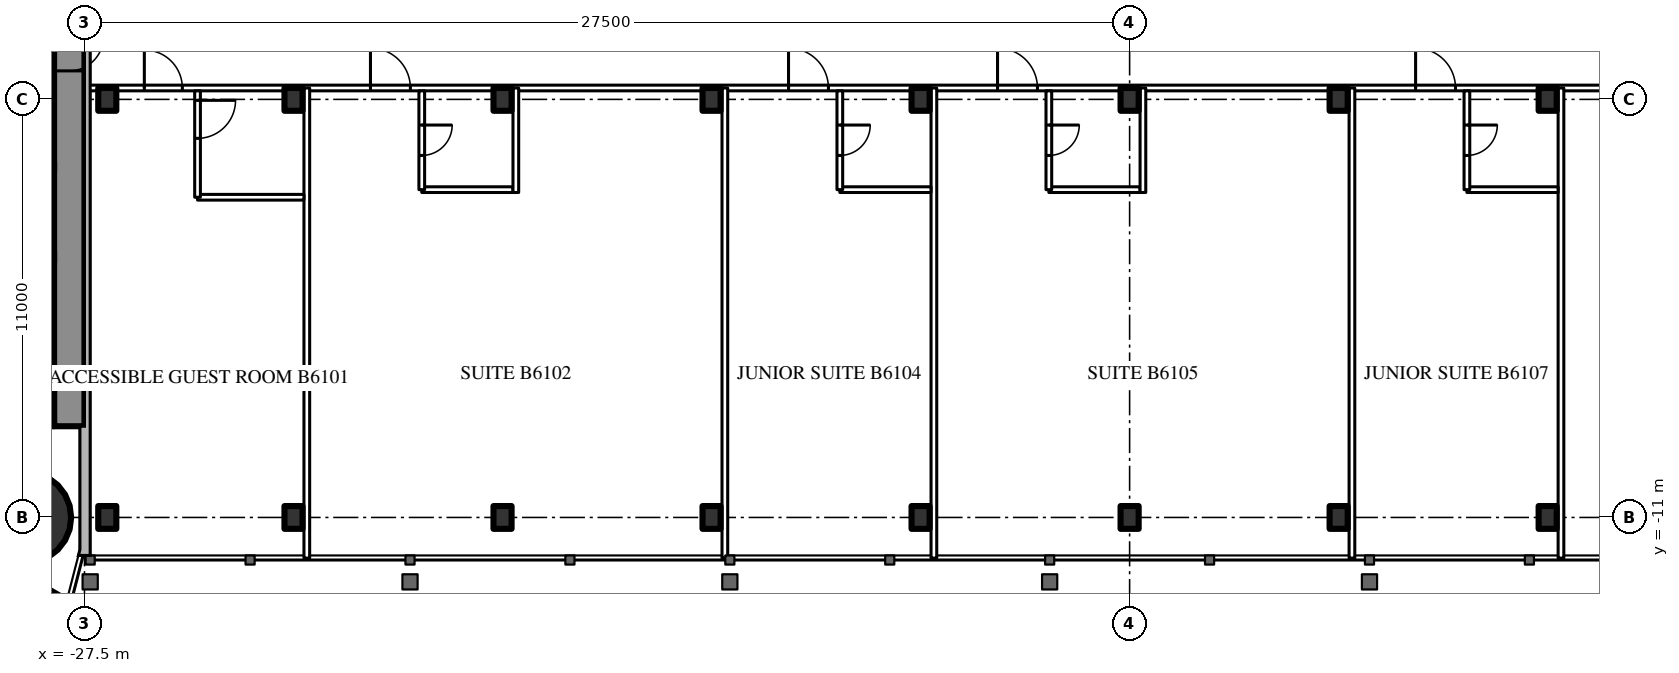
"""IFC4 building model, lengths in metres.
Left out: names, types, materials, properties, quantities, classifications, styles, units other than length and angle.
Written with IfcOpenShell. Run it as: python <this file> out.ifc"""

import sys

from ifc_helpers import new_model, si_unit, direction, frame, frame_2d, origin, origin_2d, place, context, subcontext, project, spatial, rectangle, circle, i_section, extrude, element, fill, save


model = new_model("IFC4")
c1 = context("Model", 3, precision=1e-05, world=origin(), true_north=direction((0.0, 1.0)))
c2 = subcontext(c1, "Body", "Model", "MODEL_VIEW")
j1 = project(units=[si_unit("LENGTHUNIT", "METRE"), si_unit("PLANEANGLEUNIT", "RADIAN")], contexts=[c1])
p1 = place(None, origin())
s1 = spatial("IfcSite", under=j1, at=p1, CompositionType="ELEMENT")
p2 = place(p1, origin())
s2 = spatial("IfcBuilding", under=s1, at=p2, CompositionType="ELEMENT")
p3 = place(p2, frame((0.0, 0.0, 229.7)))
s3 = spatial("IfcBuildingStorey", under=s2, at=p3, CompositionType="ELEMENT", Elevation=229.7)
p4 = place(p3, frame((-29.05, -11.0, 0.0), z_axis=(0.0, 0.0, 1.0), x_axis=(1.0, 0.0, 0.0)))
e1 = element("IfcColumn", 1, at=p4, inside=s3, PredefinedType="COLUMN", context=c2, shape_type="SweptSolid", body=[
    extrude(circle(Radius=1.2, at=origin_2d()), origin(), (0.0, 0.0, 1.0), 3.6),
])
p5 = place(p3, frame((-27.9, 8.6, 0.0), z_axis=(0.0, 0.0, 1.0), x_axis=(0.0, -1.0, 0.0)))
e2 = element("IfcWall", 2, at=p5, inside=s3, PredefinedType="SHEAR", context=c2, shape_type="SweptSolid", body=[
    extrude(rectangle(XDim=17.2, YDim=0.8, at=frame_2d((8.6, 0.0))), origin(), (0.0, 0.0, 1.0), 3.6),
])
p6 = place(p5, frame((6.95, 0.0, 0.0)))
e3 = element("IfcOpeningElement", 3, at=p6, cuts=e2, PredefinedType="OPENING", context=c2, shape_type="SweptSolid", body=[
    extrude(rectangle(XDim=0.9, YDim=2.2, at=frame_2d((0.45, 1.1))), frame((0.0, 0.41, 0.0), z_axis=(0.0, -1.0, 0.0), x_axis=(1.0, 0.0, 0.0)), (0.0, 0.0, 1.0), 0.82),
])
p7 = place(p3, frame((-28.3, -8.0, 0.0), z_axis=(0.0, 0.0, 1.0), x_axis=(-1.0, 0.0, 0.0)))
e4 = element("IfcWall", 4, at=p7, inside=s3, PredefinedType="SHEAR", context=c2, shape_type="SweptSolid", body=[
    extrude(rectangle(XDim=8.4, YDim=1.2, at=frame_2d((4.2, 0.0))), origin(), (0.0, 0.0, 1.0), 3.6),
])
p8 = place(p7, frame((0.25, 0.0, 0.0)))
e5 = element("IfcOpeningElement", 5, at=p8, cuts=e4, PredefinedType="OPENING", context=c2, shape_type="SweptSolid", body=[
    extrude(rectangle(XDim=1.0, YDim=2.2, at=frame_2d((0.5, 1.1))), frame((0.0, 0.61, 0.0), z_axis=(0.0, -1.0, 0.0), x_axis=(1.0, 0.0, 0.0)), (0.0, 0.0, 1.0), 1.22),
])
p9 = place(p3, frame((-28.3, -4.15, 0.0), z_axis=(0.0, 0.0, 1.0), x_axis=(-1.0, 0.0, 0.0)))
e6 = element("IfcWall", 6, at=p9, inside=s3, PredefinedType="SHEAR", context=c2, shape_type="SweptSolid", body=[
    extrude(rectangle(XDim=8.4, YDim=0.3, at=frame_2d((4.2, 0.0))), origin(), (0.0, 0.0, 1.0), 3.6),
])
p10 = place(p3, frame((-28.3, -1.775, 0.0), z_axis=(0.0, 0.0, 1.0), x_axis=(-1.0, 0.0, 0.0)))
e7 = element("IfcWall", 7, at=p10, inside=s3, PredefinedType="SHEAR", context=c2, shape_type="SweptSolid", body=[
    extrude(rectangle(XDim=2.9, YDim=0.25, at=frame_2d((1.45, 0.0))), origin(), (0.0, 0.0, 1.0), 3.6),
])
p11 = place(p3, frame((-27.2, 14.3, 0.0), z_axis=(0.0, 0.0, 1.0), x_axis=(-0.866026593062, -0.499997940104, 0.0)))
e8 = element("IfcWall", 8, at=p11, inside=s3, PredefinedType="SHEAR", context=c2, shape_type="SweptSolid", body=[
    extrude(rectangle(XDim=28.946, YDim=1.2, at=frame_2d((14.473, 0.0))), origin(), (0.0, 0.0, 1.0), 3.6),
])
p12 = place(p11, frame((4.6, 0.0, 0.0)))
e9 = element("IfcOpeningElement", 9, at=p12, cuts=e8, PredefinedType="OPENING", context=c2, shape_type="SweptSolid", body=[
    extrude(rectangle(XDim=1.0, YDim=2.2, at=frame_2d((0.5, 1.1))), frame((0.0, 0.61, 0.0), z_axis=(0.0, -1.0, 0.0), x_axis=(1.0, 0.0, 0.0)), (0.0, 0.0, 1.0), 1.22),
])
p13 = place(p11, frame((13.395, 0.0, 0.0)))
e10 = element("IfcOpeningElement", 10, at=p13, cuts=e8, PredefinedType="OPENING", context=c2, shape_type="SweptSolid", body=[
    extrude(rectangle(XDim=1.8, YDim=2.2, at=frame_2d((0.9, 1.1))), frame((0.0, 0.61, 0.0), z_axis=(0.0, -1.0, 0.0), x_axis=(1.0, 0.0, 0.0)), (0.0, 0.0, 1.0), 1.22),
])
p14 = place(p3, frame((-27.2, -14.3, 0.0), z_axis=(0.0, 0.0, 1.0), x_axis=(-0.866024021859, 0.500002393557, 0.0)))
e11 = element("IfcWall", 11, at=p14, inside=s3, PredefinedType="SHEAR", context=c2, shape_type="SweptSolid", body=[
    extrude(rectangle(XDim=27.907, YDim=1.2, at=frame_2d((13.954, 0.0))), origin(), (0.0, 0.0, 1.0), 3.6),
])
p15 = place(p14, frame((4.6, 0.0, 0.0)))
e12 = element("IfcOpeningElement", 12, at=p15, cuts=e11, PredefinedType="OPENING", context=c2, shape_type="SweptSolid", body=[
    extrude(rectangle(XDim=1.0, YDim=2.2, at=frame_2d((0.5, 1.1))), frame((0.0, 0.61, 0.0), z_axis=(0.0, -1.0, 0.0), x_axis=(1.0, 0.0, 0.0)), (0.0, 0.0, 1.0), 1.22),
])
p16 = place(p14, frame((13.395, 0.0, 0.0)))
e13 = element("IfcOpeningElement", 13, at=p16, cuts=e11, PredefinedType="OPENING", context=c2, shape_type="SweptSolid", body=[
    extrude(rectangle(XDim=1.8, YDim=2.2, at=frame_2d((0.9, 1.1))), frame((0.0, 0.61, 0.0), z_axis=(0.0, -1.0, 0.0), x_axis=(1.0, 0.0, 0.0)), (0.0, 0.0, 1.0), 1.22),
])
for number, where, z_axis, x_axis in (
    (14, (-26.9, -11.0, 0.0), (0.0, 0.0, 1.0), (1.0, 0.0, 0.0)),
    (15, (-22.0, -11.0, 0.0), (0.0, 0.0, 1.0), (1.0, 0.0, 0.0)),
    (16, (-16.5, -11.0, 0.0), (0.0, 0.0, 1.0), (1.0, 0.0, 0.0)),
    (17, (-11.0, -11.0, 0.0), (0.0, 0.0, 1.0), (1.0, 0.0, 0.0)),
    (18, (-5.5, -11.0, 0.0), (0.0, 0.0, 1.0), (1.0, 0.0, 0.0)),
    (19, (0.0, -11.0, 0.0), (0.0, 0.0, 1.0), (1.0, 0.0, 0.0)),
    (20, (5.5, -11.0, 0.0), (0.0, 0.0, 1.0), (1.0, 0.0, 0.0)),
    (21, (11.0, -11.0, 0.0), (0.0, 0.0, 1.0), (1.0, 0.0, 0.0)),
    (22, (-26.9, 0.0, 0.0), (0.0, 0.0, 1.0), (1.0, 0.0, 0.0)),
    (23, (-22.0, 0.0, 0.0), (0.0, 0.0, 1.0), (1.0, 0.0, 0.0)),
    (24, (-16.5, 0.0, 0.0), (0.0, 0.0, 1.0), (1.0, 0.0, 0.0)),
    (25, (-11.0, 0.0, 0.0), (0.0, 0.0, 1.0), (1.0, 0.0, 0.0)),
    (26, (-5.5, 0.0, 0.0), (0.0, 0.0, 1.0), (1.0, 0.0, 0.0)),
    (27, (0.0, 0.0, 0.0), (0.0, 0.0, 1.0), (1.0, 0.0, 0.0)),
    (28, (5.5, 0.0, 0.0), (0.0, 0.0, 1.0), (1.0, 0.0, 0.0)),
    (29, (11.0, 0.0, 0.0), (0.0, 0.0, 1.0), (1.0, 0.0, 0.0)),
):
    element("IfcColumn", number, at=place(p3, frame(where, z_axis=z_axis, x_axis=x_axis)), inside=s3, PredefinedType="COLUMN", context=c2, shape_type="SweptSolid", body=[
        extrude(i_section(OverallWidth=0.476, OverallDepth=0.6, WebThickness=0.1, FlangeThickness=0.14, FilletRadius=0.02, at=origin_2d()), origin(), (0.0, 0.0, 1.0), 3.6),
    ])
p17 = place(p3, frame((-27.5, 0.3, 0.0), z_axis=(0.0, 0.0, 1.0), x_axis=(1.0, 0.0, 0.0)))
e30 = element("IfcWall", 30, at=p17, inside=s3, PredefinedType="PARTITIONING", context=c2, shape_type="SweptSolid", body=[
    extrude(rectangle(XDim=55.0, YDim=0.15, at=frame_2d((27.5, 0.0))), origin(), (0.0, 0.0, 1.0), 2.4),
])
p18 = place(p17, frame((1.575, 0.0, 0.0)))
e31 = element("IfcOpeningElement", 31, at=p18, cuts=e30, PredefinedType="OPENING", context=c2, shape_type="SweptSolid", body=[
    extrude(rectangle(XDim=1.0, YDim=2.2, at=frame_2d((0.5, 1.1))), frame((0.0, 0.085, 0.0), z_axis=(0.0, -1.0, 0.0), x_axis=(1.0, 0.0, 0.0)), (0.0, 0.0, 1.0), 0.17),
])
p19 = place(p17, frame((7.525, 0.0, 0.0)))
e32 = element("IfcOpeningElement", 32, at=p19, cuts=e30, PredefinedType="OPENING", context=c2, shape_type="SweptSolid", body=[
    extrude(rectangle(XDim=1.05, YDim=2.4, at=frame_2d((0.525, 1.2))), frame((0.0, 0.085, 0.0), z_axis=(0.0, -1.0, 0.0), x_axis=(1.0, 0.0, 0.0)), (0.0, 0.0, 1.0), 0.17),
])
p20 = place(p17, frame((18.525, 0.0, 0.0)))
e33 = element("IfcOpeningElement", 33, at=p20, cuts=e30, PredefinedType="OPENING", context=c2, shape_type="SweptSolid", body=[
    extrude(rectangle(XDim=1.05, YDim=2.4, at=frame_2d((0.525, 1.2))), frame((0.0, 0.085, 0.0), z_axis=(0.0, -1.0, 0.0), x_axis=(1.0, 0.0, 0.0)), (0.0, 0.0, 1.0), 0.17),
])
p21 = place(p17, frame((24.025, 0.0, 0.0)))
e34 = element("IfcOpeningElement", 34, at=p21, cuts=e30, PredefinedType="OPENING", context=c2, shape_type="SweptSolid", body=[
    extrude(rectangle(XDim=1.05, YDim=2.4, at=frame_2d((0.525, 1.2))), frame((0.0, 0.085, 0.0), z_axis=(0.0, -1.0, 0.0), x_axis=(1.0, 0.0, 0.0)), (0.0, 0.0, 1.0), 0.17),
])
p22 = place(p17, frame((35.025, 0.0, 0.0)))
e35 = element("IfcOpeningElement", 35, at=p22, cuts=e30, PredefinedType="OPENING", context=c2, shape_type="SweptSolid", body=[
    extrude(rectangle(XDim=1.05, YDim=2.4, at=frame_2d((0.525, 1.2))), frame((0.0, 0.085, 0.0), z_axis=(0.0, -1.0, 0.0), x_axis=(1.0, 0.0, 0.0)), (0.0, 0.0, 1.0), 0.17),
])
p23 = place(p17, frame((40.525, 0.0, 0.0)))
e36 = element("IfcOpeningElement", 36, at=p23, cuts=e30, PredefinedType="OPENING", context=c2, shape_type="SweptSolid", body=[
    extrude(rectangle(XDim=1.05, YDim=2.4, at=frame_2d((0.525, 1.2))), frame((0.0, 0.085, 0.0), z_axis=(0.0, -1.0, 0.0), x_axis=(1.0, 0.0, 0.0)), (0.0, 0.0, 1.0), 0.17),
])
p24 = place(p17, frame((52.525, 0.0, 0.0)))
e37 = element("IfcOpeningElement", 37, at=p24, cuts=e30, PredefinedType="OPENING", context=c2, shape_type="SweptSolid", body=[
    extrude(rectangle(XDim=1.05, YDim=2.4, at=frame_2d((0.525, 1.2))), frame((0.0, 0.085, 0.0), z_axis=(0.0, -1.0, 0.0), x_axis=(1.0, 0.0, 0.0)), (0.0, 0.0, 1.0), 0.17),
])
for number, where, z_axis, x_axis in (
    (38, (-21.65, -12.07, 0.0), (0.0, 0.0, 1.0), (0.0, 1.0, 0.0)),
    (39, (-10.65, -12.07, 0.0), (0.0, 0.0, 1.0), (0.0, 1.0, 0.0)),
    (40, (-5.15, -12.07, 0.0), (0.0, 0.0, 1.0), (0.0, 1.0, 0.0)),
    (41, (5.85, -12.07, 0.0), (0.0, 0.0, 1.0), (0.0, 1.0, 0.0)),
    (42, (11.35, -12.07, 0.0), (0.0, 0.0, 1.0), (0.0, 1.0, 0.0)),
):
    element("IfcWall", number, at=place(p3, frame(where, z_axis=z_axis, x_axis=x_axis)), inside=s3, PredefinedType="PARTITIONING", context=c2, shape_type="SweptSolid", body=[
        extrude(rectangle(XDim=12.37, YDim=0.15, at=frame_2d((6.185, 0.0))), origin(), (0.0, 0.0, 1.0), 3.4),
    ])
p25 = place(p3, frame((-24.525, -2.575, 0.0), z_axis=(0.0, 0.0, 1.0), x_axis=(1.0, 0.0, 0.0)))
e43 = element("IfcWall", 43, at=p25, inside=s3, PredefinedType="PARTITIONING", context=c2, shape_type="SweptSolid", body=[
    extrude(rectangle(XDim=2.8, YDim=0.15, at=frame_2d((1.4, 0.0))), origin(), (0.0, 0.0, 1.0), 3.4),
])
p26 = place(p3, frame((-24.525, -2.575, 0.0), z_axis=(0.0, 0.0, 1.0), x_axis=(0.0, 1.0, 0.0)))
e44 = element("IfcWall", 44, at=p26, inside=s3, PredefinedType="PARTITIONING", context=c2, shape_type="SweptSolid", body=[
    extrude(rectangle(XDim=2.8, YDim=0.15, at=frame_2d((1.4, 0.0))), origin(), (0.0, 0.0, 1.0), 3.4),
])
p27 = place(p26, frame((1.55, 0.0, 0.0)))
e45 = element("IfcOpeningElement", 45, at=p27, cuts=e44, PredefinedType="OPENING", context=c2, shape_type="SweptSolid", body=[
    extrude(rectangle(XDim=1.0, YDim=2.2, at=frame_2d((0.5, 1.1))), frame((0.0, 0.085, 0.0), z_axis=(0.0, -1.0, 0.0), x_axis=(1.0, 0.0, 0.0)), (0.0, 0.0, 1.0), 0.17),
])
p28 = place(p3, frame((-18.625, -2.375, 0.0), z_axis=(0.0, 0.0, 1.0), x_axis=(1.0, 0.0, 0.0)))
e46 = element("IfcWall", 46, at=p28, inside=s3, PredefinedType="PARTITIONING", context=c2, shape_type="SweptSolid", body=[
    extrude(rectangle(XDim=2.4, YDim=0.15, at=frame_2d((1.2, 0.0))), origin(), (0.0, 0.0, 1.0), 3.4),
])
p29 = place(p3, frame((-18.625, -2.375, 0.0), z_axis=(0.0, 0.0, 1.0), x_axis=(0.0, 1.0, 0.0)))
e47 = element("IfcWall", 47, at=p29, inside=s3, PredefinedType="PARTITIONING", context=c2, shape_type="SweptSolid", body=[
    extrude(rectangle(XDim=2.6, YDim=0.15, at=frame_2d((1.3, 0.0))), origin(), (0.0, 0.0, 1.0), 3.4),
])
p30 = place(p29, frame((0.9, 0.0, 0.0)))
e48 = element("IfcOpeningElement", 48, at=p30, cuts=e47, PredefinedType="OPENING", context=c2, shape_type="SweptSolid", body=[
    extrude(rectangle(XDim=0.8, YDim=2.2, at=frame_2d((0.4, 1.1))), frame((0.0, 0.085, 0.0), z_axis=(0.0, -1.0, 0.0), x_axis=(1.0, 0.0, 0.0)), (0.0, 0.0, 1.0), 0.17),
])
p31 = place(p3, frame((-7.625, -2.375, 0.0), z_axis=(0.0, 0.0, 1.0), x_axis=(1.0, 0.0, 0.0)))
e49 = element("IfcWall", 49, at=p31, inside=s3, PredefinedType="PARTITIONING", context=c2, shape_type="SweptSolid", body=[
    extrude(rectangle(XDim=2.4, YDim=0.15, at=frame_2d((1.2, 0.0))), origin(), (0.0, 0.0, 1.0), 3.4),
])
p32 = place(p3, frame((-7.625, -2.375, 0.0), z_axis=(0.0, 0.0, 1.0), x_axis=(0.0, 1.0, 0.0)))
e50 = element("IfcWall", 50, at=p32, inside=s3, PredefinedType="PARTITIONING", context=c2, shape_type="SweptSolid", body=[
    extrude(rectangle(XDim=2.6, YDim=0.15, at=frame_2d((1.3, 0.0))), origin(), (0.0, 0.0, 1.0), 3.4),
])
p33 = place(p32, frame((0.9, 0.0, 0.0)))
e51 = element("IfcOpeningElement", 51, at=p33, cuts=e50, PredefinedType="OPENING", context=c2, shape_type="SweptSolid", body=[
    extrude(rectangle(XDim=0.8, YDim=2.2, at=frame_2d((0.4, 1.1))), frame((0.0, 0.085, 0.0), z_axis=(0.0, -1.0, 0.0), x_axis=(1.0, 0.0, 0.0)), (0.0, 0.0, 1.0), 0.17),
])
p34 = place(p3, frame((-2.125, -2.375, 0.0), z_axis=(0.0, 0.0, 1.0), x_axis=(1.0, 0.0, 0.0)))
e52 = element("IfcWall", 52, at=p34, inside=s3, PredefinedType="PARTITIONING", context=c2, shape_type="SweptSolid", body=[
    extrude(rectangle(XDim=2.4, YDim=0.15, at=frame_2d((1.2, 0.0))), origin(), (0.0, 0.0, 1.0), 3.4),
])
p35 = place(p3, frame((-2.125, -2.375, 0.0), z_axis=(0.0, 0.0, 1.0), x_axis=(0.0, 1.0, 0.0)))
e53 = element("IfcWall", 53, at=p35, inside=s3, PredefinedType="PARTITIONING", context=c2, shape_type="SweptSolid", body=[
    extrude(rectangle(XDim=2.6, YDim=0.15, at=frame_2d((1.3, 0.0))), origin(), (0.0, 0.0, 1.0), 3.4),
])
p36 = place(p35, frame((0.9, 0.0, 0.0)))
e54 = element("IfcOpeningElement", 54, at=p36, cuts=e53, PredefinedType="OPENING", context=c2, shape_type="SweptSolid", body=[
    extrude(rectangle(XDim=0.8, YDim=2.2, at=frame_2d((0.4, 1.1))), frame((0.0, 0.085, 0.0), z_axis=(0.0, -1.0, 0.0), x_axis=(1.0, 0.0, 0.0)), (0.0, 0.0, 1.0), 0.17),
])
p37 = place(p3, frame((8.875, -2.375, 0.0), z_axis=(0.0, 0.0, 1.0), x_axis=(1.0, 0.0, 0.0)))
e55 = element("IfcWall", 55, at=p37, inside=s3, PredefinedType="PARTITIONING", context=c2, shape_type="SweptSolid", body=[
    extrude(rectangle(XDim=2.4, YDim=0.15, at=frame_2d((1.2, 0.0))), origin(), (0.0, 0.0, 1.0), 3.4),
])
p38 = place(p3, frame((8.875, -2.375, 0.0), z_axis=(0.0, 0.0, 1.0), x_axis=(0.0, 1.0, 0.0)))
e56 = element("IfcWall", 56, at=p38, inside=s3, PredefinedType="PARTITIONING", context=c2, shape_type="SweptSolid", body=[
    extrude(rectangle(XDim=2.6, YDim=0.15, at=frame_2d((1.3, 0.0))), origin(), (0.0, 0.0, 1.0), 3.4),
])
p39 = place(p38, frame((0.9, 0.0, 0.0)))
e57 = element("IfcOpeningElement", 57, at=p39, cuts=e56, PredefinedType="OPENING", context=c2, shape_type="SweptSolid", body=[
    extrude(rectangle(XDim=0.8, YDim=2.2, at=frame_2d((0.4, 1.1))), frame((0.0, 0.085, 0.0), z_axis=(0.0, -1.0, 0.0), x_axis=(1.0, 0.0, 0.0)), (0.0, 0.0, 1.0), 0.17),
])
for number, where, z_axis, x_axis in (
    (58, (-16.15, -2.45, 0.0), (0.0, 0.0, 1.0), (0.0, 1.0, 0.0)),
    (59, (0.35, -2.45, 0.0), (0.0, 0.0, 1.0), (0.0, 1.0, 0.0)),
):
    element("IfcWall", number, at=place(p3, frame(where, z_axis=z_axis, x_axis=x_axis)), inside=s3, PredefinedType="PARTITIONING", context=c2, shape_type="SweptSolid", body=[
        extrude(rectangle(XDim=2.75, YDim=0.15, at=frame_2d((1.375, 0.0))), origin(), (0.0, 0.0, 1.0), 3.4),
    ])
p40 = place(p6, origin())
e60 = element("IfcDoor", 60, at=p40, inside=s3, OperationType="SINGLE_SWING_LEFT", PredefinedType="DOOR", context=c2, shape_type="SweptSolid", body=[
    extrude(rectangle(XDim=0.9, YDim=2.2, at=frame_2d((0.45, 1.1))), frame((0.0, 0.025, 0.0), z_axis=(0.0, -1.0, 0.0), x_axis=(1.0, 0.0, 0.0)), (0.0, 0.0, 1.0), 0.05),
])
fill(e3, e60)
p41 = place(p27, origin())
e61 = element("IfcDoor", 61, at=p41, inside=s3, OperationType="SINGLE_SWING_RIGHT", PredefinedType="DOOR", context=c2, shape_type="SweptSolid", body=[
    extrude(rectangle(XDim=1.0, YDim=2.2, at=frame_2d((0.5, 1.1))), frame((0.0, 0.025, 0.0), z_axis=(0.0, -1.0, 0.0), x_axis=(1.0, 0.0, 0.0)), (0.0, 0.0, 1.0), 0.05),
])
fill(e45, e61)
p42 = place(p18, origin())
e62 = element("IfcDoor", 62, at=p42, inside=s3, OperationType="SINGLE_SWING_LEFT", PredefinedType="DOOR", context=c2, shape_type="SweptSolid", body=[
    extrude(rectangle(XDim=1.0, YDim=2.2, at=frame_2d((0.5, 1.1))), frame((0.0, 0.025, 0.0), z_axis=(0.0, -1.0, 0.0), x_axis=(1.0, 0.0, 0.0)), (0.0, 0.0, 1.0), 0.05),
])
fill(e31, e62)
p43 = place(p30, origin())
e63 = element("IfcDoor", 63, at=p43, inside=s3, OperationType="SINGLE_SWING_RIGHT", PredefinedType="DOOR", context=c2, shape_type="SweptSolid", body=[
    extrude(rectangle(XDim=0.8, YDim=2.2, at=frame_2d((0.4, 1.1))), frame((0.0, 0.025, 0.0), z_axis=(0.0, -1.0, 0.0), x_axis=(1.0, 0.0, 0.0)), (0.0, 0.0, 1.0), 0.05),
])
fill(e48, e63)
p44 = place(p19, origin())
e64 = element("IfcDoor", 64, at=p44, inside=s3, OperationType="SINGLE_SWING_LEFT", PredefinedType="DOOR", context=c2, shape_type="SweptSolid", body=[
    extrude(rectangle(XDim=1.05, YDim=2.4, at=frame_2d((0.525, 1.2))), frame((0.0, 0.025, 0.0), z_axis=(0.0, -1.0, 0.0), x_axis=(1.0, 0.0, 0.0)), (0.0, 0.0, 1.0), 0.05),
])
fill(e32, e64)
p45 = place(p33, origin())
e65 = element("IfcDoor", 65, at=p45, inside=s3, OperationType="SINGLE_SWING_RIGHT", PredefinedType="DOOR", context=c2, shape_type="SweptSolid", body=[
    extrude(rectangle(XDim=0.8, YDim=2.2, at=frame_2d((0.4, 1.1))), frame((0.0, 0.025, 0.0), z_axis=(0.0, -1.0, 0.0), x_axis=(1.0, 0.0, 0.0)), (0.0, 0.0, 1.0), 0.05),
])
fill(e51, e65)
p46 = place(p20, origin())
e66 = element("IfcDoor", 66, at=p46, inside=s3, OperationType="SINGLE_SWING_LEFT", PredefinedType="DOOR", context=c2, shape_type="SweptSolid", body=[
    extrude(rectangle(XDim=1.05, YDim=2.4, at=frame_2d((0.525, 1.2))), frame((0.0, 0.025, 0.0), z_axis=(0.0, -1.0, 0.0), x_axis=(1.0, 0.0, 0.0)), (0.0, 0.0, 1.0), 0.05),
])
fill(e33, e66)
p47 = place(p36, origin())
e67 = element("IfcDoor", 67, at=p47, inside=s3, OperationType="SINGLE_SWING_RIGHT", PredefinedType="DOOR", context=c2, shape_type="SweptSolid", body=[
    extrude(rectangle(XDim=0.8, YDim=2.2, at=frame_2d((0.4, 1.1))), frame((0.0, 0.025, 0.0), z_axis=(0.0, -1.0, 0.0), x_axis=(1.0, 0.0, 0.0)), (0.0, 0.0, 1.0), 0.05),
])
fill(e54, e67)
p48 = place(p21, origin())
e68 = element("IfcDoor", 68, at=p48, inside=s3, OperationType="SINGLE_SWING_LEFT", PredefinedType="DOOR", context=c2, shape_type="SweptSolid", body=[
    extrude(rectangle(XDim=1.05, YDim=2.4, at=frame_2d((0.525, 1.2))), frame((0.0, 0.025, 0.0), z_axis=(0.0, -1.0, 0.0), x_axis=(1.0, 0.0, 0.0)), (0.0, 0.0, 1.0), 0.05),
])
fill(e34, e68)
p49 = place(p39, origin())
e69 = element("IfcDoor", 69, at=p49, inside=s3, OperationType="SINGLE_SWING_RIGHT", PredefinedType="DOOR", context=c2, shape_type="SweptSolid", body=[
    extrude(rectangle(XDim=0.8, YDim=2.2, at=frame_2d((0.4, 1.1))), frame((0.0, 0.025, 0.0), z_axis=(0.0, -1.0, 0.0), x_axis=(1.0, 0.0, 0.0)), (0.0, 0.0, 1.0), 0.05),
])
fill(e57, e69)
p50 = place(p22, origin())
e70 = element("IfcDoor", 70, at=p50, inside=s3, OperationType="SINGLE_SWING_LEFT", PredefinedType="DOOR", context=c2, shape_type="SweptSolid", body=[
    extrude(rectangle(XDim=1.05, YDim=2.4, at=frame_2d((0.525, 1.2))), frame((0.0, 0.025, 0.0), z_axis=(0.0, -1.0, 0.0), x_axis=(1.0, 0.0, 0.0)), (0.0, 0.0, 1.0), 0.05),
])
fill(e35, e70)
save(model, sys.argv[1])
